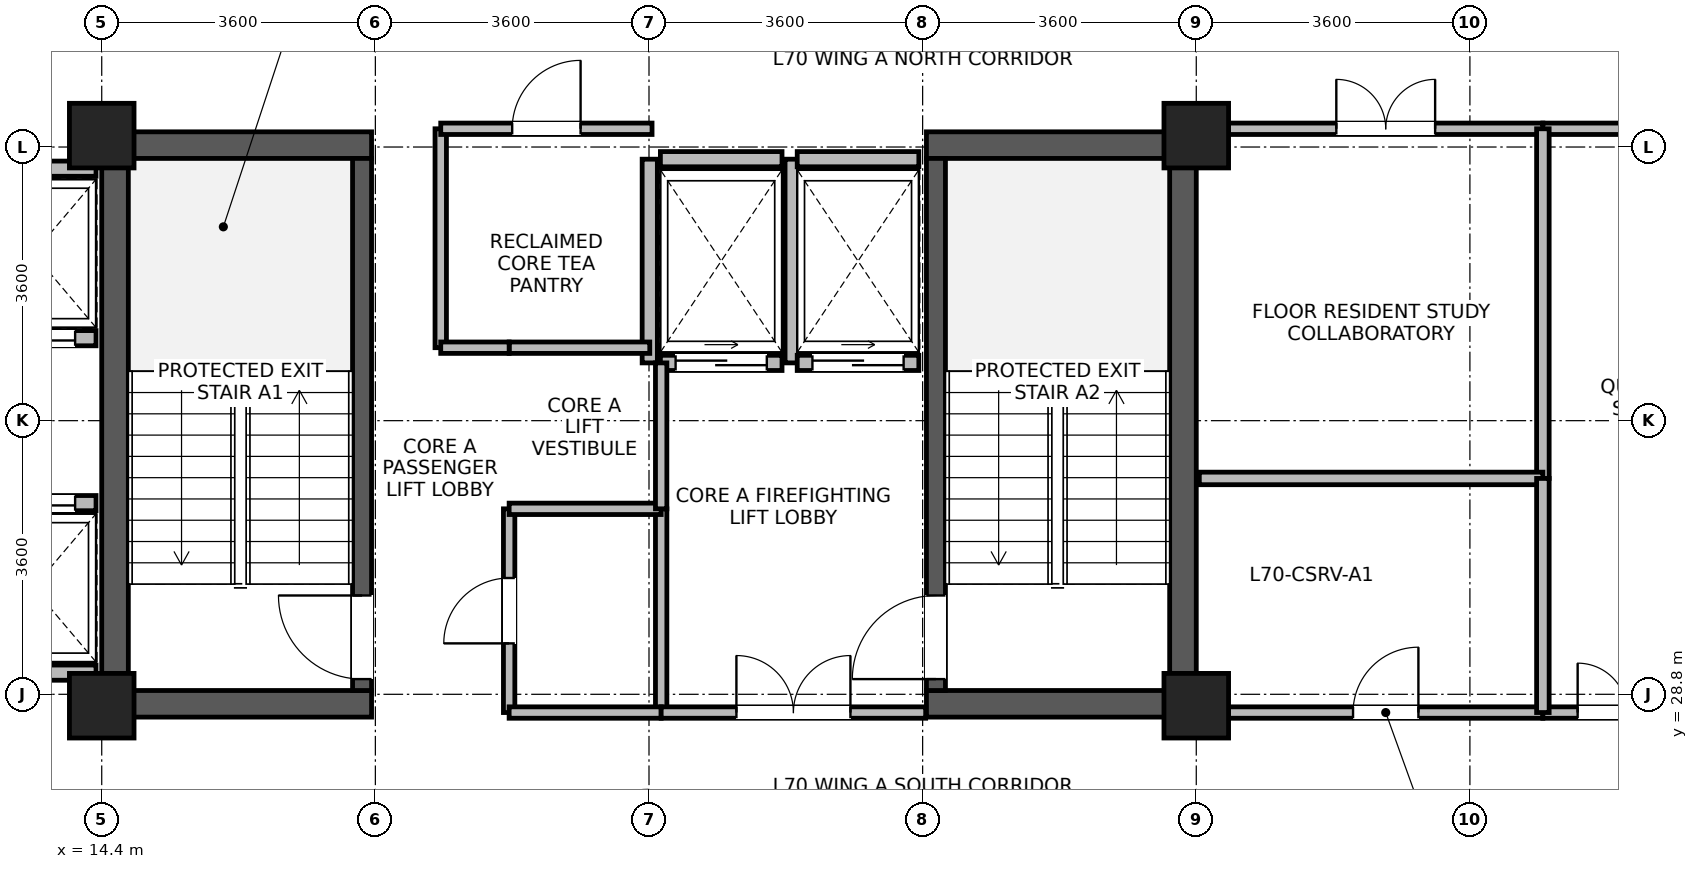
"""IFC4 building model, lengths in metres.
Left out: names, types, materials, properties, quantities, classifications, styles, units other than length and angle.
Written with IfcOpenShell. Run it as: python <this file> out.ifc"""

import sys

from ifc_helpers import new_model, si_unit, direction, frame, frame_2d, origin, origin_2d, place, context, subcontext, project, spatial, rectangle, extrude, source, transform, mapped, element, fill, save


model = new_model("IFC4")
c1 = context("Model", 3, precision=1e-05, world=origin(), true_north=direction((0.0, 1.0)))
c2 = subcontext(c1, "Body", "Model", "MODEL_VIEW")
j1 = project(units=[si_unit("LENGTHUNIT", "METRE"), si_unit("PLANEANGLEUNIT", "RADIAN")], contexts=[c1])
p1 = place(None, origin())
s1 = spatial("IfcSite", under=j1, at=p1, CompositionType="ELEMENT")
p2 = place(p1, origin())
s2 = spatial("IfcBuilding", under=s1, at=p2, CompositionType="ELEMENT")
p3 = place(p2, frame((0.0, 0.0, 272.1)))
s3 = spatial("IfcBuildingStorey", under=s2, at=p3, CompositionType="ELEMENT", Elevation=272.1)
for number, where, z_axis, x_axis in (
    (1, (14.575, 28.5, 0.0), (0.0, 0.0, 1.0), (0.0, 1.0, 0.0)),
    (2, (28.625, 28.5, 0.0), (0.0, 0.0, 1.0), (0.0, 1.0, 0.0)),
):
    element("IfcWall", number, at=place(p3, frame(where, z_axis=z_axis, x_axis=x_axis)), inside=s3, PredefinedType="SHEAR", context=c2, shape_type="SweptSolid", body=[
        extrude(rectangle(XDim=7.7, YDim=0.35, at=frame_2d((3.85, 0.0))), origin(), (0.0, 0.0, 1.0), 3.475),
    ])
for number, where, z_axis, x_axis in (
    (3, (14.75, 28.675, 0.0), (0.0, 0.0, 1.0), (1.0, 0.0, 0.0)),
    (4, (25.25, 28.675, 0.0), (0.0, 0.0, 1.0), (1.0, 0.0, 0.0)),
    (5, (14.75, 36.025, 0.0), (0.0, 0.0, 1.0), (1.0, 0.0, 0.0)),
    (6, (25.25, 36.025, 0.0), (0.0, 0.0, 1.0), (1.0, 0.0, 0.0)),
):
    element("IfcWall", number, at=place(p3, frame(where, z_axis=z_axis, x_axis=x_axis)), inside=s3, PredefinedType="SHEAR", context=c2, shape_type="SweptSolid", body=[
        extrude(rectangle(XDim=3.2, YDim=0.35, at=frame_2d((1.6, 0.0))), origin(), (0.0, 0.0, 1.0), 3.475),
    ])
p4 = place(p3, frame((17.825, 28.85, 0.0), z_axis=(0.0, 0.0, 1.0), x_axis=(0.0, 1.0, 0.0)))
e7 = element("IfcWall", 7, at=p4, inside=s3, PredefinedType="SHEAR", context=c2, shape_type="SweptSolid", body=[
    extrude(rectangle(XDim=7.0, YDim=0.25, at=frame_2d((3.5, 0.0))), origin(), (0.0, 0.0, 1.0), 3.475),
])
p5 = place(p4, frame((0.15, 0.0, 0.0)))
e8 = element("IfcOpeningElement", 8, at=p5, cuts=e7, PredefinedType="OPENING", context=c2, shape_type="SweptSolid", body=[
    extrude(rectangle(XDim=1.1, YDim=2.08, at=frame_2d((0.55, 1.04))), frame((0.0, 0.135, 0.0), z_axis=(0.0, -1.0, 0.0), x_axis=(1.0, 0.0, 0.0)), (0.0, 0.0, 1.0), 0.27),
])
p6 = place(p3, frame((25.375, 28.85, 0.0), z_axis=(0.0, 0.0, 1.0), x_axis=(0.0, 1.0, 0.0)))
e9 = element("IfcWall", 9, at=p6, inside=s3, PredefinedType="SHEAR", context=c2, shape_type="SweptSolid", body=[
    extrude(rectangle(XDim=7.0, YDim=0.25, at=frame_2d((3.5, 0.0))), origin(), (0.0, 0.0, 1.0), 3.475),
])
p7 = place(p6, frame((0.15, 0.0, 0.0)))
e10 = element("IfcOpeningElement", 10, at=p7, cuts=e9, PredefinedType="OPENING", context=c2, shape_type="SweptSolid", body=[
    extrude(rectangle(XDim=1.1, YDim=2.08, at=frame_2d((0.55, 1.04))), frame((0.0, 0.135, 0.0), z_axis=(0.0, -1.0, 0.0), x_axis=(1.0, 0.0, 0.0)), (0.0, 0.0, 1.0), 0.27),
])
m1 = source(origin(), c2, "Body", "SweptSolid", [
    extrude(rectangle(XDim=0.85, YDim=0.85, at=origin_2d()), origin(), (0.0, 0.0, 1.0), 3.7),
])
for number, where, z_axis, x_axis in (
    (11, (14.4, 28.65, 0.0), (0.0, 0.0, 1.0), (1.0, 0.0, 0.0)),
    (12, (14.4, 36.15, 0.0), (0.0, 0.0, 1.0), (1.0, 0.0, 0.0)),
    (13, (28.8, 28.65, 0.0), (0.0, 0.0, 1.0), (1.0, 0.0, 0.0)),
    (14, (28.8, 36.15, 0.0), (0.0, 0.0, 1.0), (1.0, 0.0, 0.0)),
):
    element("IfcColumn", number, at=place(p3, frame(where, z_axis=z_axis, x_axis=x_axis)), inside=s3, PredefinedType="COLUMN", context=c2, shape_type="MappedRepresentation", body=[
        mapped(m1, transform((0.0, 0.0, 0.0), x_axis=(1.0, 0.0, 0.0), y_axis=(0.0, 1.0, 0.0), z_axis=(0.0, 0.0, 1.0), scale=1.0)),
    ])
p8 = place(p3, frame((12.675, 33.485, 0.0), z_axis=(0.0, 0.0, 1.0), x_axis=(1.0, 0.0, 0.0)))
e15 = element("IfcWall", 15, at=p8, inside=s3, PredefinedType="PARTITIONING", context=c2, shape_type="SweptSolid", body=[
    extrude(rectangle(XDim=1.65, YDim=0.2, at=frame_2d((0.825, 0.0))), origin(), (0.0, 0.0, 1.0), 3.455),
])
p9 = place(p8, frame((0.275, 0.0, 0.0)))
e16 = element("IfcOpeningElement", 16, at=p9, cuts=e15, PredefinedType="OPENING", context=c2, shape_type="SweptSolid", body=[
    extrude(rectangle(XDim=1.1, YDim=2.12, at=frame_2d((0.55, 1.06))), frame((0.0, 0.11, 0.0), z_axis=(0.0, -1.0, 0.0), x_axis=(1.0, 0.0, 0.0)), (0.0, 0.0, 1.0), 0.22),
])
for number, where, z_axis, x_axis in (
    (17, (12.675, 35.715, 0.0), (0.0, 0.0, 1.0), (1.0, 0.0, 0.0)),
    (18, (12.675, 29.085, 0.0), (0.0, 0.0, 1.0), (1.0, 0.0, 0.0)),
):
    element("IfcWall", number, at=place(p3, frame(where, z_axis=z_axis, x_axis=x_axis)), inside=s3, PredefinedType="PARTITIONING", context=c2, shape_type="SweptSolid", body=[
        extrude(rectangle(XDim=1.65, YDim=0.2, at=frame_2d((0.825, 0.0))), origin(), (0.0, 0.0, 1.0), 3.455),
    ])
p10 = place(p3, frame((12.675, 31.315, 0.0), z_axis=(0.0, 0.0, 1.0), x_axis=(1.0, 0.0, 0.0)))
e19 = element("IfcWall", 19, at=p10, inside=s3, PredefinedType="PARTITIONING", context=c2, shape_type="SweptSolid", body=[
    extrude(rectangle(XDim=1.65, YDim=0.2, at=frame_2d((0.825, 0.0))), origin(), (0.0, 0.0, 1.0), 3.455),
])
p11 = place(p10, frame((0.275, 0.0, 0.0)))
e20 = element("IfcOpeningElement", 20, at=p11, cuts=e19, PredefinedType="OPENING", context=c2, shape_type="SweptSolid", body=[
    extrude(rectangle(XDim=1.1, YDim=2.12, at=frame_2d((0.55, 1.06))), frame((0.0, 0.11, 0.0), z_axis=(0.0, -1.0, 0.0), x_axis=(1.0, 0.0, 0.0)), (0.0, 0.0, 1.0), 0.22),
])
p12 = place(p3, frame((21.75, 33.16, 0.0), z_axis=(0.0, 0.0, 1.0), x_axis=(1.0, 0.0, 0.0)))
e21 = element("IfcWall", 21, at=p12, inside=s3, PredefinedType="PARTITIONING", context=c2, shape_type="SweptSolid", body=[
    extrude(rectangle(XDim=1.6, YDim=0.2, at=frame_2d((0.8, 0.0))), origin(), (0.0, 0.0, 1.0), 3.455),
])
p13 = place(p12, frame((0.2, 0.0, 0.0)))
e22 = element("IfcOpeningElement", 22, at=p13, cuts=e21, PredefinedType="OPENING", context=c2, shape_type="SweptSolid", body=[
    extrude(rectangle(XDim=1.2, YDim=2.12, at=frame_2d((0.6, 1.06))), frame((0.0, 0.11, 0.0), z_axis=(0.0, -1.0, 0.0), x_axis=(1.0, 0.0, 0.0)), (0.0, 0.0, 1.0), 0.22),
])
p14 = place(p3, frame((21.75, 35.84, 0.0), z_axis=(0.0, 0.0, 1.0), x_axis=(1.0, 0.0, 0.0)))
e23 = element("IfcWall", 23, at=p14, inside=s3, PredefinedType="PARTITIONING", context=c2, shape_type="SweptSolid", body=[
    extrude(rectangle(XDim=1.6, YDim=0.2, at=frame_2d((0.8, 0.0))), origin(), (0.0, 0.0, 1.0), 2.555),
])
for number, where, z_axis, x_axis in (
    (24, (21.61, 33.16, 0.0), (0.0, 0.0, 1.0), (0.0, 1.0, 0.0)),
    (25, (23.49, 33.16, 0.0), (0.0, 0.0, 1.0), (0.0, 1.0, 0.0)),
):
    element("IfcWall", number, at=place(p3, frame(where, z_axis=z_axis, x_axis=x_axis)), inside=s3, PredefinedType="PARTITIONING", context=c2, shape_type="SweptSolid", body=[
        extrude(rectangle(XDim=2.68, YDim=0.2, at=frame_2d((1.34, 0.0))), origin(), (0.0, 0.0, 1.0), 3.455),
    ])
p15 = place(p3, frame((23.55, 33.16, 0.0), z_axis=(0.0, 0.0, 1.0), x_axis=(1.0, 0.0, 0.0)))
e26 = element("IfcWall", 26, at=p15, inside=s3, PredefinedType="PARTITIONING", context=c2, shape_type="SweptSolid", body=[
    extrude(rectangle(XDim=1.6, YDim=0.2, at=frame_2d((0.8, 0.0))), origin(), (0.0, 0.0, 1.0), 3.455),
])
p16 = place(p15, frame((0.2, 0.0, 0.0)))
e27 = element("IfcOpeningElement", 27, at=p16, cuts=e26, PredefinedType="OPENING", context=c2, shape_type="SweptSolid", body=[
    extrude(rectangle(XDim=1.2, YDim=2.12, at=frame_2d((0.6, 1.06))), frame((0.0, 0.11, 0.0), z_axis=(0.0, -1.0, 0.0), x_axis=(1.0, 0.0, 0.0)), (0.0, 0.0, 1.0), 0.22),
])
p17 = place(p3, frame((23.55, 35.84, 0.0), z_axis=(0.0, 0.0, 1.0), x_axis=(1.0, 0.0, 0.0)))
e28 = element("IfcWall", 28, at=p17, inside=s3, PredefinedType="PARTITIONING", context=c2, shape_type="SweptSolid", body=[
    extrude(rectangle(XDim=1.6, YDim=0.2, at=frame_2d((0.8, 0.0))), origin(), (0.0, 0.0, 1.0), 2.555),
])
p18 = place(p3, frame((29.225, 28.56, 0.0), z_axis=(0.0, 0.0, 1.0), x_axis=(1.0, 0.0, 0.0)))
e29 = element("IfcWall", 29, at=p18, inside=s3, PredefinedType="PARTITIONING", context=c2, shape_type="SweptSolid", body=[
    extrude(rectangle(XDim=4.135, YDim=0.15, at=frame_2d((2.067, 0.0))), origin(), (0.0, 0.0, 1.0), 2.905),
])
p19 = place(p18, frame((1.637, 0.0, 0.0)))
e30 = element("IfcOpeningElement", 30, at=p19, cuts=e29, PredefinedType="OPENING", context=c2, shape_type="SweptSolid", body=[
    extrude(rectangle(XDim=0.86, YDim=2.02, at=frame_2d((0.43, 1.01))), frame((0.0, 0.085, 0.0), z_axis=(0.0, -1.0, 0.0), x_axis=(1.0, 0.0, 0.0)), (0.0, 0.0, 1.0), 0.17),
])
p20 = place(p3, frame((29.225, 36.24, 0.0), z_axis=(0.0, 0.0, 1.0), x_axis=(1.0, 0.0, 0.0)))
e31 = element("IfcWall", 31, at=p20, inside=s3, PredefinedType="PARTITIONING", context=c2, shape_type="SweptSolid", body=[
    extrude(rectangle(XDim=4.135, YDim=0.15, at=frame_2d((2.067, 0.0))), origin(), (0.0, 0.0, 1.0), 2.905),
])
p21 = place(p20, frame((1.417, 0.0, 0.0)))
e32 = element("IfcOpeningElement", 32, at=p21, cuts=e31, PredefinedType="OPENING", context=c2, shape_type="SweptSolid", body=[
    extrude(rectangle(XDim=1.3, YDim=2.12, at=frame_2d((0.65, 1.06))), frame((0.0, 0.085, 0.0), z_axis=(0.0, -1.0, 0.0), x_axis=(1.0, 0.0, 0.0)), (0.0, 0.0, 1.0), 0.17),
])
p22 = place(p3, frame((33.36, 28.56, 0.0), z_axis=(0.0, 0.0, 1.0), x_axis=(1.0, 0.0, 0.0)))
e33 = element("IfcWall", 33, at=p22, inside=s3, PredefinedType="PARTITIONING", context=c2, shape_type="SweptSolid", body=[
    extrude(rectangle(XDim=2.215, YDim=0.15, at=frame_2d((1.107, 0.0))), origin(), (0.0, 0.0, 1.0), 2.905),
])
p23 = place(p22, frame((0.458, 0.0, 0.0)))
e34 = element("IfcOpeningElement", 34, at=p23, cuts=e33, PredefinedType="OPENING", context=c2, shape_type="SweptSolid", body=[
    extrude(rectangle(XDim=1.3, YDim=2.12, at=frame_2d((0.65, 1.06))), frame((0.0, 0.085, 0.0), z_axis=(0.0, -1.0, 0.0), x_axis=(1.0, 0.0, 0.0)), (0.0, 0.0, 1.0), 0.17),
])
p24 = place(p3, frame((33.36, 36.24, 0.0), z_axis=(0.0, 0.0, 1.0), x_axis=(1.0, 0.0, 0.0)))
e35 = element("IfcWall", 35, at=p24, inside=s3, PredefinedType="PARTITIONING", context=c2, shape_type="SweptSolid", body=[
    extrude(rectangle(XDim=2.215, YDim=0.15, at=frame_2d((1.107, 0.0))), origin(), (0.0, 0.0, 1.0), 2.905),
])
p25 = place(p3, frame((18.86, 33.36, 0.0), z_axis=(0.0, 0.0, 1.0), x_axis=(0.0, 1.0, 0.0)))
e36 = element("IfcWall", 36, at=p25, inside=s3, PredefinedType="PARTITIONING", context=c2, shape_type="SweptSolid", body=[
    extrude(rectangle(XDim=2.88, YDim=0.15, at=frame_2d((1.44, 0.0))), origin(), (0.0, 0.0, 1.0), 3.455),
])
p26 = place(p3, frame((18.86, 36.24, 0.0), z_axis=(0.0, 0.0, 1.0), x_axis=(1.0, 0.0, 0.0)))
e37 = element("IfcWall", 37, at=p26, inside=s3, PredefinedType="PARTITIONING", context=c2, shape_type="SweptSolid", body=[
    extrude(rectangle(XDim=2.78, YDim=0.15, at=frame_2d((1.39, 0.0))), origin(), (0.0, 0.0, 1.0), 2.555),
])
p27 = place(p26, frame((0.94, 0.0, 0.0)))
e38 = element("IfcOpeningElement", 38, at=p27, cuts=e37, PredefinedType="OPENING", context=c2, shape_type="SweptSolid", body=[
    extrude(rectangle(XDim=0.9, YDim=2.08, at=frame_2d((0.45, 1.04))), frame((0.0, 0.085, 0.0), z_axis=(0.0, -1.0, 0.0), x_axis=(1.0, 0.0, 0.0)), (0.0, 0.0, 1.0), 0.17),
])
p28 = place(p3, frame((19.76, 28.56, 0.0), z_axis=(0.0, 0.0, 1.0), x_axis=(0.0, 1.0, 0.0)))
e39 = element("IfcWall", 39, at=p28, inside=s3, PredefinedType="PARTITIONING", context=c2, shape_type="SweptSolid", body=[
    extrude(rectangle(XDim=2.68, YDim=0.15, at=frame_2d((1.34, 0.0))), origin(), (0.0, 0.0, 1.0), 3.455),
])
p29 = place(p28, frame((0.91, 0.0, 0.0)))
e40 = element("IfcOpeningElement", 40, at=p29, cuts=e39, PredefinedType="OPENING", context=c2, shape_type="SweptSolid", body=[
    extrude(rectangle(XDim=0.86, YDim=2.02, at=frame_2d((0.43, 1.01))), frame((0.0, 0.085, 0.0), z_axis=(0.0, -1.0, 0.0), x_axis=(1.0, 0.0, 0.0)), (0.0, 0.0, 1.0), 0.17),
])
p30 = place(p3, frame((21.76, 28.56, 0.0), z_axis=(0.0, 0.0, 1.0), x_axis=(0.0, 1.0, 0.0)))
e41 = element("IfcWall", 41, at=p30, inside=s3, PredefinedType="PARTITIONING", context=c2, shape_type="SweptSolid", body=[
    extrude(rectangle(XDim=2.68, YDim=0.15, at=frame_2d((1.34, 0.0))), origin(), (0.0, 0.0, 1.0), 3.455),
])
p31 = place(p3, frame((19.76, 28.56, 0.0), z_axis=(0.0, 0.0, 1.0), x_axis=(1.0, 0.0, 0.0)))
e42 = element("IfcWall", 42, at=p31, inside=s3, PredefinedType="PARTITIONING", context=c2, shape_type="SweptSolid", body=[
    extrude(rectangle(XDim=2.0, YDim=0.15, at=frame_2d((1.0, 0.0))), origin(), (0.0, 0.0, 1.0), 2.555),
])
p32 = place(p3, frame((19.76, 31.24, 0.0), z_axis=(0.0, 0.0, 1.0), x_axis=(1.0, 0.0, 0.0)))
e43 = element("IfcWall", 43, at=p32, inside=s3, PredefinedType="PARTITIONING", context=c2, shape_type="SweptSolid", body=[
    extrude(rectangle(XDim=2.0, YDim=0.15, at=frame_2d((1.0, 0.0))), origin(), (0.0, 0.0, 1.0), 3.455),
])
p33 = place(p3, frame((19.76, 33.36, 0.0), z_axis=(0.0, 0.0, 1.0), x_axis=(1.0, 0.0, 0.0)))
e44 = element("IfcWall", 44, at=p33, inside=s3, PredefinedType="PARTITIONING", context=c2, shape_type="SweptSolid", body=[
    extrude(rectangle(XDim=1.85, YDim=0.15, at=frame_2d((0.925, 0.0))), origin(), (0.0, 0.0, 1.0), 3.455),
])
p34 = place(p3, frame((18.86, 33.36, 0.0), z_axis=(0.0, 0.0, 1.0), x_axis=(1.0, 0.0, 0.0)))
e45 = element("IfcWall", 45, at=p34, inside=s3, PredefinedType="PARTITIONING", context=c2, shape_type="SweptSolid", body=[
    extrude(rectangle(XDim=0.9, YDim=0.15, at=frame_2d((0.45, 0.0))), origin(), (0.0, 0.0, 1.0), 3.455),
])
p35 = place(p3, frame((33.36, 31.64, 0.0), z_axis=(0.0, 0.0, 1.0), x_axis=(0.0, 1.0, 0.0)))
e46 = element("IfcWall", 46, at=p35, inside=s3, PredefinedType="PARTITIONING", context=c2, shape_type="SweptSolid", body=[
    extrude(rectangle(XDim=4.6, YDim=0.165, at=frame_2d((2.3, 0.0))), origin(), (0.0, 0.0, 1.0), 3.455),
])
p36 = place(p3, frame((28.84, 31.64, 0.0), z_axis=(0.0, 0.0, 1.0), x_axis=(1.0, 0.0, 0.0)))
e47 = element("IfcWall", 47, at=p36, inside=s3, PredefinedType="PARTITIONING", context=c2, shape_type="SweptSolid", body=[
    extrude(rectangle(XDim=4.52, YDim=0.165, at=frame_2d((2.26, 0.0))), origin(), (0.0, 0.0, 1.0), 3.455),
])
p37 = place(p3, frame((21.76, 28.56, 0.0), z_axis=(0.0, 0.0, 1.0), x_axis=(1.0, 0.0, 0.0)))
e48 = element("IfcWall", 48, at=p37, inside=s3, PredefinedType="PARTITIONING", context=c2, shape_type="SweptSolid", body=[
    extrude(rectangle(XDim=3.48, YDim=0.15, at=frame_2d((1.74, 0.0))), origin(), (0.0, 0.0, 1.0), 2.555),
])
p38 = place(p37, frame((0.99, 0.0, 0.0)))
e49 = element("IfcOpeningElement", 49, at=p38, cuts=e48, PredefinedType="OPENING", context=c2, shape_type="SweptSolid", body=[
    extrude(rectangle(XDim=1.5, YDim=2.1, at=frame_2d((0.75, 1.05))), frame((0.0, 0.085, 0.0), z_axis=(0.0, -1.0, 0.0), x_axis=(1.0, 0.0, 0.0)), (0.0, 0.0, 1.0), 0.17),
])
p39 = place(p3, frame((33.36, 28.56, 0.0), z_axis=(0.0, 0.0, 1.0), x_axis=(0.0, 1.0, 0.0)))
e50 = element("IfcWall", 50, at=p39, inside=s3, PredefinedType="PARTITIONING", context=c2, shape_type="SweptSolid", body=[
    extrude(rectangle(XDim=3.08, YDim=0.165, at=frame_2d((1.54, 0.0))), origin(), (0.0, 0.0, 1.0), 3.455),
])
p40 = place(p3, frame((21.76, 31.24, 0.0), z_axis=(0.0, 0.0, 1.0), x_axis=(0.0, 1.0, 0.0)))
e51 = element("IfcWall", 51, at=p40, inside=s3, PredefinedType="PARTITIONING", context=c2, shape_type="SweptSolid", body=[
    extrude(rectangle(XDim=1.92, YDim=0.15, at=frame_2d((0.96, 0.0))), origin(), (0.0, 0.0, 1.0), 3.455),
])
p41 = place(p5, origin())
e52 = element("IfcDoor", 52, at=p41, inside=s3, OperationType="SINGLE_SWING_RIGHT", PredefinedType="DOOR", context=c2, shape_type="SweptSolid", body=[
    extrude(rectangle(XDim=1.1, YDim=2.08, at=frame_2d((0.55, 1.04))), frame((0.0, 0.025, 0.0), z_axis=(0.0, -1.0, 0.0), x_axis=(1.0, 0.0, 0.0)), (0.0, 0.0, 1.0), 0.05),
])
fill(e8, e52)
p42 = place(p7, origin())
e53 = element("IfcDoor", 53, at=p42, inside=s3, OperationType="SINGLE_SWING_LEFT", PredefinedType="DOOR", context=c2, shape_type="SweptSolid", body=[
    extrude(rectangle(XDim=1.1, YDim=2.08, at=frame_2d((0.55, 1.04))), frame((0.0, 0.025, 0.0), z_axis=(0.0, -1.0, 0.0), x_axis=(1.0, 0.0, 0.0)), (0.0, 0.0, 1.0), 0.05),
])
fill(e10, e53)
p43 = place(p9, origin())
e54 = element("IfcDoor", 54, at=p43, inside=s3, OperationType="SLIDING_TO_LEFT", PredefinedType="DOOR", context=c2, shape_type="SweptSolid", body=[
    extrude(rectangle(XDim=1.1, YDim=2.12, at=frame_2d((0.55, 1.06))), frame((0.0, 0.025, 0.0), z_axis=(0.0, -1.0, 0.0), x_axis=(1.0, 0.0, 0.0)), (0.0, 0.0, 1.0), 0.05),
])
fill(e16, e54)
p44 = place(p11, origin())
e55 = element("IfcDoor", 55, at=p44, inside=s3, OperationType="SLIDING_TO_LEFT", PredefinedType="DOOR", context=c2, shape_type="SweptSolid", body=[
    extrude(rectangle(XDim=1.1, YDim=2.12, at=frame_2d((0.55, 1.06))), frame((0.0, 0.025, 0.0), z_axis=(0.0, -1.0, 0.0), x_axis=(1.0, 0.0, 0.0)), (0.0, 0.0, 1.0), 0.05),
])
fill(e20, e55)
p45 = place(p13, origin())
e56 = element("IfcDoor", 56, at=p45, inside=s3, OperationType="SLIDING_TO_RIGHT", PredefinedType="DOOR", context=c2, shape_type="SweptSolid", body=[
    extrude(rectangle(XDim=1.2, YDim=2.12, at=frame_2d((0.6, 1.06))), frame((0.0, 0.025, 0.0), z_axis=(0.0, -1.0, 0.0), x_axis=(1.0, 0.0, 0.0)), (0.0, 0.0, 1.0), 0.05),
])
fill(e22, e56)
p46 = place(p16, origin())
e57 = element("IfcDoor", 57, at=p46, inside=s3, OperationType="SLIDING_TO_RIGHT", PredefinedType="DOOR", context=c2, shape_type="SweptSolid", body=[
    extrude(rectangle(XDim=1.2, YDim=2.12, at=frame_2d((0.6, 1.06))), frame((0.0, 0.025, 0.0), z_axis=(0.0, -1.0, 0.0), x_axis=(1.0, 0.0, 0.0)), (0.0, 0.0, 1.0), 0.05),
])
fill(e27, e57)
p47 = place(p19, origin())
e58 = element("IfcDoor", 58, at=p47, inside=s3, OperationType="SINGLE_SWING_RIGHT", PredefinedType="DOOR", context=c2, shape_type="SweptSolid", body=[
    extrude(rectangle(XDim=0.86, YDim=2.02, at=frame_2d((0.43, 1.01))), frame((0.0, 0.025, 0.0), z_axis=(0.0, -1.0, 0.0), x_axis=(1.0, 0.0, 0.0)), (0.0, 0.0, 1.0), 0.05),
])
fill(e30, e58)
p48 = place(p21, origin())
e59 = element("IfcDoor", 59, at=p48, inside=s3, OperationType="DOUBLE_DOOR_SINGLE_SWING", PredefinedType="DOOR", context=c2, shape_type="SweptSolid", body=[
    extrude(rectangle(XDim=1.3, YDim=2.12, at=frame_2d((0.65, 1.06))), frame((0.0, 0.025, 0.0), z_axis=(0.0, -1.0, 0.0), x_axis=(1.0, 0.0, 0.0)), (0.0, 0.0, 1.0), 0.05),
])
fill(e32, e59)
p49 = place(p23, origin())
e60 = element("IfcDoor", 60, at=p49, inside=s3, OperationType="DOUBLE_DOOR_SINGLE_SWING", PredefinedType="DOOR", context=c2, shape_type="SweptSolid", body=[
    extrude(rectangle(XDim=1.3, YDim=2.12, at=frame_2d((0.65, 1.06))), frame((0.0, 0.025, 0.0), z_axis=(0.0, -1.0, 0.0), x_axis=(1.0, 0.0, 0.0)), (0.0, 0.0, 1.0), 0.05),
])
fill(e34, e60)
p50 = place(p27, origin())
e61 = element("IfcDoor", 61, at=p50, inside=s3, OperationType="SINGLE_SWING_RIGHT", PredefinedType="DOOR", context=c2, shape_type="SweptSolid", body=[
    extrude(rectangle(XDim=0.9, YDim=2.08, at=frame_2d((0.45, 1.04))), frame((0.0, 0.025, 0.0), z_axis=(0.0, -1.0, 0.0), x_axis=(1.0, 0.0, 0.0)), (0.0, 0.0, 1.0), 0.05),
])
fill(e38, e61)
p51 = place(p29, origin())
e62 = element("IfcDoor", 62, at=p51, inside=s3, OperationType="SINGLE_SWING_LEFT", PredefinedType="DOOR", context=c2, shape_type="SweptSolid", body=[
    extrude(rectangle(XDim=0.86, YDim=2.02, at=frame_2d((0.43, 1.01))), frame((0.0, 0.025, 0.0), z_axis=(0.0, -1.0, 0.0), x_axis=(1.0, 0.0, 0.0)), (0.0, 0.0, 1.0), 0.05),
])
fill(e40, e62)
p52 = place(p38, origin())
e63 = element("IfcDoor", 63, at=p52, inside=s3, OperationType="DOUBLE_DOOR_SINGLE_SWING", PredefinedType="DOOR", context=c2, shape_type="SweptSolid", body=[
    extrude(rectangle(XDim=1.5, YDim=2.1, at=frame_2d((0.75, 1.05))), frame((0.0, 0.025, 0.0), z_axis=(0.0, -1.0, 0.0), x_axis=(1.0, 0.0, 0.0)), (0.0, 0.0, 1.0), 0.05),
])
fill(e49, e63)
save(model, sys.argv[1])
